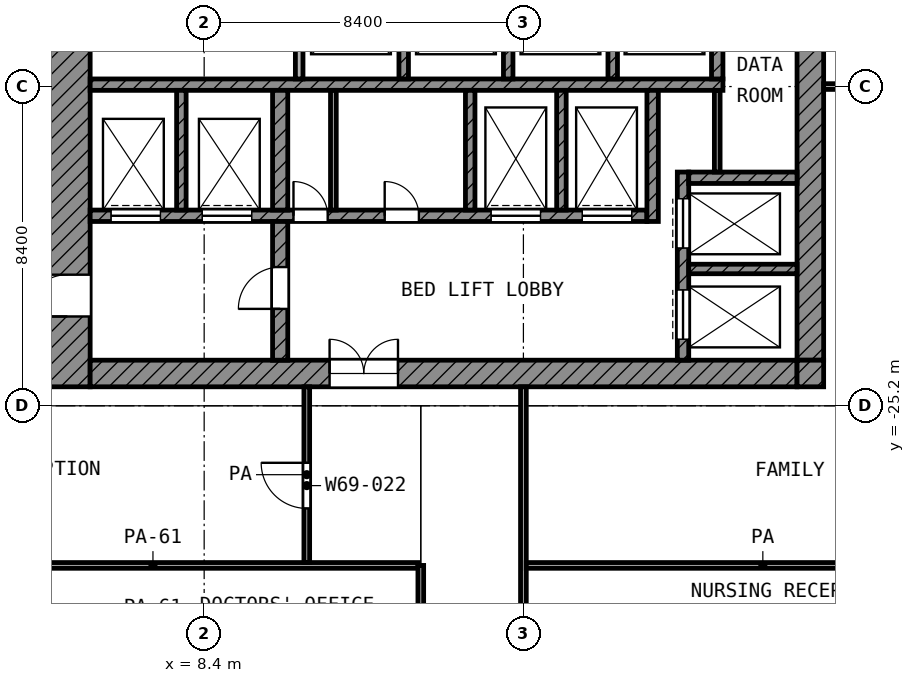
"""IFC4 building model, lengths in metres.
Left out: names, types, materials, properties, quantities, classifications, styles, units other than length and angle.
Written with IfcOpenShell. Run it as: python <this file> out.ifc"""

import sys

from ifc_helpers import new_model, si_unit, direction, frame, frame_2d, origin, place, context, subcontext, project, spatial, rectangle, extrude, element, fill, save


model = new_model("IFC4")
c1 = context("Model", 3, precision=1e-05, world=origin(), true_north=direction((0.0, 1.0)))
c2 = subcontext(c1, "Body", "Model", "MODEL_VIEW")
j1 = project(units=[si_unit("LENGTHUNIT", "METRE"), si_unit("PLANEANGLEUNIT", "RADIAN")], contexts=[c1])
p1 = place(None, origin())
s1 = spatial("IfcSite", under=j1, at=p1, CompositionType="ELEMENT")
p2 = place(p1, origin())
s2 = spatial("IfcBuilding", under=s1, at=p2, CompositionType="ELEMENT")
p3 = place(p2, frame((0.0, 0.0, 319.6)))
s3 = spatial("IfcBuildingStorey", under=s2, at=p3, CompositionType="ELEMENT", Elevation=319.6)
p4 = place(p3, frame((4.8, -24.7, 0.0), z_axis=(0.0, 0.0, 1.0), x_axis=(0.0, 1.0, 0.0)))
e1 = element("IfcWall", 1, at=p4, inside=s3, PredefinedType="SHEAR", context=c2, shape_type="SweptSolid", body=[
    extrude(rectangle(XDim=19.3, YDim=1.2, at=frame_2d((9.65, 0.0))), origin(), (0.0, 0.0, 1.0), 3.6),
])
p5 = place(p4, frame((11.15, 0.0, 0.0)))
e2 = element("IfcOpeningElement", 2, at=p5, cuts=e1, PredefinedType="OPENING", context=c2, shape_type="SweptSolid", body=[
    extrude(rectangle(XDim=1.1, YDim=2.1, at=frame_2d((0.55, 1.05))), frame((0.0, 0.61, 0.0), z_axis=(0.0, -1.0, 0.0), x_axis=(1.0, 0.0, 0.0)), (0.0, 0.0, 1.0), 1.22),
])
p6 = place(p4, frame((1.85, 0.0, 0.0)))
e3 = element("IfcOpeningElement", 3, at=p6, cuts=e1, PredefinedType="OPENING", context=c2, shape_type="SweptSolid", body=[
    extrude(rectangle(XDim=1.1, YDim=2.1, at=frame_2d((0.55, 1.05))), frame((0.0, 0.61, 0.0), z_axis=(0.0, -1.0, 0.0), x_axis=(1.0, 0.0, 0.0)), (0.0, 0.0, 1.0), 1.22),
])
p7 = place(p3, frame((24.35, -24.0, 0.0), z_axis=(0.0, 0.0, 1.0), x_axis=(0.0, 1.0, 0.0)))
e4 = element("IfcWall", 4, at=p7, inside=s3, PredefinedType="SHEAR", context=c2, shape_type="SweptSolid", body=[
    extrude(rectangle(XDim=18.6, YDim=0.7, at=frame_2d((9.3, 0.0))), origin(), (0.0, 0.0, 1.0), 3.6),
])
p8 = place(p7, frame((10.5, 0.0, 0.0)))
e5 = element("IfcOpeningElement", 5, at=p8, cuts=e4, PredefinedType="OPENING", context=c2, shape_type="SweptSolid", body=[
    extrude(rectangle(XDim=1.8, YDim=2.1, at=frame_2d((0.9, 1.05))), frame((0.0, 0.36, 0.0), z_axis=(0.0, -1.0, 0.0), x_axis=(1.0, 0.0, 0.0)), (0.0, 0.0, 1.0), 0.72),
])
p9 = place(p3, frame((5.4, -24.35, 0.0), z_axis=(0.0, 0.0, 1.0), x_axis=(1.0, 0.0, 0.0)))
e6 = element("IfcWall", 6, at=p9, inside=s3, PredefinedType="SHEAR", context=c2, shape_type="SweptSolid", body=[
    extrude(rectangle(XDim=18.6, YDim=0.7, at=frame_2d((9.3, 0.0))), origin(), (0.0, 0.0, 1.0), 3.6),
])
p10 = place(p9, frame((6.3, 0.0, 0.0)))
e7 = element("IfcOpeningElement", 7, at=p10, cuts=e6, PredefinedType="OPENING", context=c2, shape_type="SweptSolid", body=[
    extrude(rectangle(XDim=1.8, YDim=2.1, at=frame_2d((0.9, 1.05))), frame((0.0, 0.36, 0.0), z_axis=(0.0, -1.0, 0.0), x_axis=(1.0, 0.0, 0.0)), (0.0, 0.0, 1.0), 0.72),
])
p11 = place(p3, frame((24.35, -24.7, 0.0), z_axis=(0.0, 0.0, 1.0), x_axis=(0.0, 1.0, 0.0)))
e8 = element("IfcWall", 8, at=p11, inside=s3, PredefinedType="SHEAR", context=c2, shape_type="SweptSolid", body=[
    extrude(rectangle(XDim=0.7, YDim=0.7, at=frame_2d((0.35, 0.0))), origin(), (0.0, 0.0, 1.0), 3.6),
])
p12 = place(p3, frame((5.4, -16.75, 0.0), z_axis=(0.0, 0.0, 1.0), x_axis=(1.0, 0.0, 0.0)))
e9 = element("IfcWall", 9, at=p12, inside=s3, PredefinedType="SHEAR", context=c2, shape_type="SweptSolid", body=[
    extrude(rectangle(XDim=16.65, YDim=0.3, at=frame_2d((8.325, 0.0))), origin(), (0.0, 0.0, 1.0), 3.6),
])
p13 = place(p3, frame((5.4, -20.2, 0.0), z_axis=(0.0, 0.0, 1.0), x_axis=(1.0, 0.0, 0.0)))
e10 = element("IfcWall", 10, at=p13, inside=s3, PredefinedType="SHEAR", context=c2, shape_type="SweptSolid", body=[
    extrude(rectangle(XDim=14.65, YDim=0.3, at=frame_2d((7.325, 0.0))), origin(), (0.0, 0.0, 1.0), 3.6),
])
p14 = place(p13, frame((10.55, 0.0, 0.0)))
e11 = element("IfcOpeningElement", 11, at=p14, cuts=e10, PredefinedType="OPENING", context=c2, shape_type="SweptSolid", body=[
    extrude(rectangle(XDim=1.3, YDim=2.1, at=frame_2d((0.65, 1.05))), frame((0.0, 0.16, 0.0), z_axis=(0.0, -1.0, 0.0), x_axis=(1.0, 0.0, 0.0)), (0.0, 0.0, 1.0), 0.32),
])
p15 = place(p13, frame((12.95, 0.0, 0.0)))
e12 = element("IfcOpeningElement", 12, at=p15, cuts=e10, PredefinedType="OPENING", context=c2, shape_type="SweptSolid", body=[
    extrude(rectangle(XDim=1.3, YDim=2.1, at=frame_2d((0.65, 1.05))), frame((0.0, 0.16, 0.0), z_axis=(0.0, -1.0, 0.0), x_axis=(1.0, 0.0, 0.0)), (0.0, 0.0, 1.0), 0.32),
])
p16 = place(p13, frame((0.55, 0.0, 0.0)))
e13 = element("IfcOpeningElement", 13, at=p16, cuts=e10, PredefinedType="OPENING", context=c2, shape_type="SweptSolid", body=[
    extrude(rectangle(XDim=1.3, YDim=2.1, at=frame_2d((0.65, 1.05))), frame((0.0, 0.16, 0.0), z_axis=(0.0, -1.0, 0.0), x_axis=(1.0, 0.0, 0.0)), (0.0, 0.0, 1.0), 0.32),
])
p17 = place(p13, frame((2.95, 0.0, 0.0)))
e14 = element("IfcOpeningElement", 14, at=p17, cuts=e10, PredefinedType="OPENING", context=c2, shape_type="SweptSolid", body=[
    extrude(rectangle(XDim=1.3, YDim=2.1, at=frame_2d((0.65, 1.05))), frame((0.0, 0.16, 0.0), z_axis=(0.0, -1.0, 0.0), x_axis=(1.0, 0.0, 0.0)), (0.0, 0.0, 1.0), 0.32),
])
p18 = place(p13, frame((5.35, 0.0, 0.0)))
e15 = element("IfcOpeningElement", 15, at=p18, cuts=e10, PredefinedType="OPENING", context=c2, shape_type="SweptSolid", body=[
    extrude(rectangle(XDim=0.9, YDim=2.1, at=frame_2d((0.45, 1.05))), frame((0.0, 0.16, 0.0), z_axis=(0.0, -1.0, 0.0), x_axis=(1.0, 0.0, 0.0)), (0.0, 0.0, 1.0), 0.32),
])
p19 = place(p13, frame((7.75, 0.0, 0.0)))
e16 = element("IfcOpeningElement", 16, at=p19, cuts=e10, PredefinedType="OPENING", context=c2, shape_type="SweptSolid", body=[
    extrude(rectangle(XDim=0.9, YDim=2.1, at=frame_2d((0.45, 1.05))), frame((0.0, 0.16, 0.0), z_axis=(0.0, -1.0, 0.0), x_axis=(1.0, 0.0, 0.0)), (0.0, 0.0, 1.0), 0.32),
])
p20 = place(p3, frame((10.4, -24.0, 0.0), z_axis=(0.0, 0.0, 1.0), x_axis=(0.0, 1.0, 0.0)))
e17 = element("IfcWall", 17, at=p20, inside=s3, PredefinedType="SHEAR", context=c2, shape_type="SweptSolid", body=[
    extrude(rectangle(XDim=3.65, YDim=0.4, at=frame_2d((1.825, 0.0))), origin(), (0.0, 0.0, 1.0), 3.6),
])
p21 = place(p20, frame((1.35, 0.0, 0.0)))
e18 = element("IfcOpeningElement", 18, at=p21, cuts=e17, PredefinedType="OPENING", context=c2, shape_type="SweptSolid", body=[
    extrude(rectangle(XDim=1.1, YDim=2.1, at=frame_2d((0.55, 1.05))), frame((0.0, 0.21, 0.0), z_axis=(0.0, -1.0, 0.0), x_axis=(1.0, 0.0, 0.0)), (0.0, 0.0, 1.0), 0.42),
])
p22 = place(p3, frame((10.4, -20.05, 0.0), z_axis=(0.0, 0.0, 1.0), x_axis=(0.0, 1.0, 0.0)))
e19 = element("IfcWall", 19, at=p22, inside=s3, PredefinedType="SHEAR", context=c2, shape_type="SweptSolid", body=[
    extrude(rectangle(XDim=3.15, YDim=0.4, at=frame_2d((1.575, 0.0))), origin(), (0.0, 0.0, 1.0), 3.6),
])
p23 = place(p3, frame((20.2, -20.35, 0.0), z_axis=(0.0, 0.0, 1.0), x_axis=(0.0, 1.0, 0.0)))
e20 = element("IfcWall", 20, at=p23, inside=s3, PredefinedType="SHEAR", context=c2, shape_type="SweptSolid", body=[
    extrude(rectangle(XDim=3.45, YDim=0.3, at=frame_2d((1.725, 0.0))), origin(), (0.0, 0.0, 1.0), 3.6),
])
p24 = place(p3, frame((21.9, -16.6, 0.0), z_axis=(0.0, 0.0, 1.0), x_axis=(0.0, 1.0, 0.0)))
e21 = element("IfcWall", 21, at=p24, inside=s3, PredefinedType="SHEAR", context=c2, shape_type="SweptSolid", body=[
    extrude(rectangle(XDim=2.35, YDim=0.3, at=frame_2d((1.175, 0.0))), origin(), (0.0, 0.0, 1.0), 3.6),
])
p25 = place(p3, frame((21.15, -19.2, 0.0), z_axis=(0.0, 0.0, 1.0), x_axis=(1.0, 0.0, 0.0)))
e22 = element("IfcWall", 22, at=p25, inside=s3, PredefinedType="SHEAR", context=c2, shape_type="SweptSolid", body=[
    extrude(rectangle(XDim=2.85, YDim=0.3, at=frame_2d((1.425, 0.0))), origin(), (0.0, 0.0, 1.0), 3.6),
])
p26 = place(p3, frame((21.0, -24.0, 0.0), z_axis=(0.0, 0.0, 1.0), x_axis=(0.0, 1.0, 0.0)))
e23 = element("IfcWall", 23, at=p26, inside=s3, PredefinedType="SHEAR", context=c2, shape_type="SweptSolid", body=[
    extrude(rectangle(XDim=4.95, YDim=0.3, at=frame_2d((2.475, 0.0))), origin(), (0.0, 0.0, 1.0), 3.6),
])
p27 = place(p26, frame((2.95, 0.0, 0.0)))
e24 = element("IfcOpeningElement", 24, at=p27, cuts=e23, PredefinedType="OPENING", context=c2, shape_type="SweptSolid", body=[
    extrude(rectangle(XDim=1.3, YDim=2.1, at=frame_2d((0.65, 1.05))), frame((0.0, 0.16, 0.0), z_axis=(0.0, -1.0, 0.0), x_axis=(1.0, 0.0, 0.0)), (0.0, 0.0, 1.0), 0.32),
])
p28 = place(p26, frame((0.55, 0.0, 0.0)))
e25 = element("IfcOpeningElement", 25, at=p28, cuts=e23, PredefinedType="OPENING", context=c2, shape_type="SweptSolid", body=[
    extrude(rectangle(XDim=1.3, YDim=2.1, at=frame_2d((0.65, 1.05))), frame((0.0, 0.16, 0.0), z_axis=(0.0, -1.0, 0.0), x_axis=(1.0, 0.0, 0.0)), (0.0, 0.0, 1.0), 0.32),
])
p29 = place(p3, frame((21.15, -21.6, 0.0), z_axis=(0.0, 0.0, 1.0), x_axis=(1.0, 0.0, 0.0)))
e26 = element("IfcWall", 26, at=p29, inside=s3, PredefinedType="SHEAR", context=c2, shape_type="SweptSolid", body=[
    extrude(rectangle(XDim=2.85, YDim=0.25, at=frame_2d((1.425, 0.0))), origin(), (0.0, 0.0, 1.0), 3.6),
])
for number, where, z_axis, x_axis in (
    (27, (7.8, -20.05, 0.0), (0.0, 0.0, 1.0), (0.0, 1.0, 0.0)),
    (28, (15.4, -20.05, 0.0), (0.0, 0.0, 1.0), (0.0, 1.0, 0.0)),
    (29, (17.8, -20.05, 0.0), (0.0, 0.0, 1.0), (0.0, 1.0, 0.0)),
):
    element("IfcWall", number, at=place(p3, frame(where, z_axis=z_axis, x_axis=x_axis)), inside=s3, PredefinedType="SHEAR", context=c2, shape_type="SweptSolid", body=[
        extrude(rectangle(XDim=3.15, YDim=0.25, at=frame_2d((1.575, 0.0))), origin(), (0.0, 0.0, 1.0), 3.6),
    ])
p30 = place(p3, frame((10.9, -16.6, 0.0), z_axis=(0.0, 0.0, 1.0), x_axis=(0.0, 1.0, 0.0)))
e30 = element("IfcWall", 30, at=p30, inside=s3, PredefinedType="PARTITIONING", context=c2, shape_type="SweptSolid", body=[
    extrude(rectangle(XDim=2.35, YDim=0.2, at=frame_2d((1.175, 0.0))), origin(), (0.0, 0.0, 1.0), 3.6),
])
for number, where, z_axis, x_axis in (
    (31, (13.65, -16.6, 0.0), (0.0, 0.0, 1.0), (0.0, 1.0, 0.0)),
    (32, (16.4, -16.6, 0.0), (0.0, 0.0, 1.0), (0.0, 1.0, 0.0)),
    (33, (19.15, -16.6, 0.0), (0.0, 0.0, 1.0), (0.0, 1.0, 0.0)),
):
    element("IfcWall", number, at=place(p3, frame(where, z_axis=z_axis, x_axis=x_axis)), inside=s3, PredefinedType="SHEAR", context=c2, shape_type="SweptSolid", body=[
        extrude(rectangle(XDim=2.35, YDim=0.25, at=frame_2d((1.175, 0.0))), origin(), (0.0, 0.0, 1.0), 3.6),
    ])
p31 = place(p3, frame((21.9, -19.05, 0.0), z_axis=(0.0, 0.0, 1.0), x_axis=(0.0, 1.0, 0.0)))
e34 = element("IfcWall", 34, at=p31, inside=s3, PredefinedType="PARTITIONING", context=c2, shape_type="SweptSolid", body=[
    extrude(rectangle(XDim=2.15, YDim=0.15, at=frame_2d((1.075, 0.0))), origin(), (0.0, 0.0, 1.0), 3.6),
])
p32 = place(p3, frame((11.8, -20.05, 0.0), z_axis=(0.0, 0.0, 1.0), x_axis=(0.0, 1.0, 0.0)))
e35 = element("IfcWall", 35, at=p32, inside=s3, PredefinedType="PARTITIONING", context=c2, shape_type="SweptSolid", body=[
    extrude(rectangle(XDim=3.15, YDim=0.15, at=frame_2d((1.575, 0.0))), origin(), (0.0, 0.0, 1.0), 3.6),
])
p33 = place(p3, frame((0.08, -29.4, 0.0), z_axis=(0.0, 0.0, 1.0), x_axis=(1.0, 0.0, 0.0)))
e36 = element("IfcWall", 36, at=p33, inside=s3, PredefinedType="PARTITIONING", context=c2, shape_type="SweptSolid", body=[
    extrude(rectangle(XDim=13.945, YDim=0.15, at=frame_2d((6.972, 0.0))), origin(), (0.0, 0.0, 1.0), 2.7),
])
p34 = place(p3, frame((16.875, -29.4, 0.0), z_axis=(0.0, 0.0, 1.0), x_axis=(1.0, 0.0, 0.0)))
e37 = element("IfcWall", 37, at=p34, inside=s3, PredefinedType="PARTITIONING", context=c2, shape_type="SweptSolid", body=[
    extrude(rectangle(XDim=12.45, YDim=0.15, at=frame_2d((6.225, 0.0))), origin(), (0.0, 0.0, 1.0), 3.6),
])
p35 = place(p3, frame((24.7, -16.8, 0.0), z_axis=(0.0, 0.0, 1.0), x_axis=(1.0, 0.0, 0.0)))
e38 = element("IfcWall", 38, at=p35, inside=s3, PredefinedType="PARTITIONING", context=c2, shape_type="SweptSolid", body=[
    extrude(rectangle(XDim=34.02, YDim=0.15, at=frame_2d((17.01, 0.0))), origin(), (0.0, 0.0, 1.0), 3.6),
])
p36 = place(p35, frame((1.85, 0.0, 0.0)))
e39 = element("IfcOpeningElement", 39, at=p36, cuts=e38, PredefinedType="OPENING", context=c2, shape_type="SweptSolid", body=[
    extrude(rectangle(XDim=1.5, YDim=2.1, at=frame_2d((0.75, 1.05))), frame((0.0, 0.085, 0.0), z_axis=(0.0, -1.0, 0.0), x_axis=(1.0, 0.0, 0.0)), (0.0, 0.0, 1.0), 0.17),
])
p37 = place(p35, frame((6.2, 0.0, 0.0)))
e40 = element("IfcOpeningElement", 40, at=p37, cuts=e38, PredefinedType="OPENING", context=c2, shape_type="SweptSolid", body=[
    extrude(rectangle(XDim=1.2, YDim=2.1, at=frame_2d((0.6, 1.05))), frame((0.0, 0.085, 0.0), z_axis=(0.0, -1.0, 0.0), x_axis=(1.0, 0.0, 0.0)), (0.0, 0.0, 1.0), 0.17),
])
p38 = place(p35, frame((10.35, 0.0, 0.0)))
e41 = element("IfcOpeningElement", 41, at=p38, cuts=e38, PredefinedType="OPENING", context=c2, shape_type="SweptSolid", body=[
    extrude(rectangle(XDim=1.0, YDim=2.1, at=frame_2d((0.5, 1.05))), frame((0.0, 0.085, 0.0), z_axis=(0.0, -1.0, 0.0), x_axis=(1.0, 0.0, 0.0)), (0.0, 0.0, 1.0), 0.17),
])
p39 = place(p35, frame((20.0, 0.0, 0.0)))
e42 = element("IfcOpeningElement", 42, at=p39, cuts=e38, PredefinedType="OPENING", context=c2, shape_type="SweptSolid", body=[
    extrude(rectangle(XDim=1.2, YDim=2.1, at=frame_2d((0.6, 1.05))), frame((0.0, 0.085, 0.0), z_axis=(0.0, -1.0, 0.0), x_axis=(1.0, 0.0, 0.0)), (0.0, 0.0, 1.0), 0.17),
])
p40 = place(p35, frame((18.4, 0.0, 0.0)))
e43 = element("IfcOpeningElement", 43, at=p40, cuts=e38, PredefinedType="OPENING", context=c2, shape_type="SweptSolid", body=[
    extrude(rectangle(XDim=1.2, YDim=2.1, at=frame_2d((0.6, 1.05))), frame((0.0, 0.085, 0.0), z_axis=(0.0, -1.0, 0.0), x_axis=(1.0, 0.0, 0.0)), (0.0, 0.0, 1.0), 0.17),
])
p41 = place(p35, frame((23.1, 0.0, 0.0)))
e44 = element("IfcOpeningElement", 44, at=p41, cuts=e38, PredefinedType="OPENING", context=c2, shape_type="SweptSolid", body=[
    extrude(rectangle(XDim=1.0, YDim=2.1, at=frame_2d((0.5, 1.05))), frame((0.0, 0.085, 0.0), z_axis=(0.0, -1.0, 0.0), x_axis=(1.0, 0.0, 0.0)), (0.0, 0.0, 1.0), 0.17),
])
p42 = place(p35, frame((29.15, 0.0, 0.0)))
e45 = element("IfcOpeningElement", 45, at=p42, cuts=e38, PredefinedType="OPENING", context=c2, shape_type="SweptSolid", body=[
    extrude(rectangle(XDim=1.5, YDim=2.1, at=frame_2d((0.75, 1.05))), frame((0.0, 0.085, 0.0), z_axis=(0.0, -1.0, 0.0), x_axis=(1.0, 0.0, 0.0)), (0.0, 0.0, 1.0), 0.17),
])
p43 = place(p3, frame((11.1, -29.325, 0.0), z_axis=(0.0, 0.0, 1.0), x_axis=(0.0, 1.0, 0.0)))
e46 = element("IfcWall", 46, at=p43, inside=s3, PredefinedType="PARTITIONING", context=c2, shape_type="SweptSolid", body=[
    extrude(rectangle(XDim=4.625, YDim=0.15, at=frame_2d((2.312, 0.0))), origin(), (0.0, 0.0, 1.0), 3.6),
])
p44 = place(p43, frame((1.425, 0.0, 0.0)))
e47 = element("IfcOpeningElement", 47, at=p44, cuts=e46, PredefinedType="OPENING", context=c2, shape_type="SweptSolid", body=[
    extrude(rectangle(XDim=1.2, YDim=2.1, at=frame_2d((0.6, 1.05))), frame((0.0, 0.085, 0.0), z_axis=(0.0, -1.0, 0.0), x_axis=(1.0, 0.0, 0.0)), (0.0, 0.0, 1.0), 0.17),
])
p45 = place(p3, frame((14.1, -31.957, 0.0), z_axis=(0.0, 0.0, 1.0), x_axis=(0.0, 1.0, 0.0)))
e48 = element("IfcWall", 48, at=p45, inside=s3, PredefinedType="PARTITIONING", context=c2, shape_type="SweptSolid", body=[
    extrude(rectangle(XDim=2.557, YDim=0.15, at=frame_2d((1.279, 0.0))), origin(), (0.0, 0.0, 1.0), 3.6),
])
p46 = place(p3, frame((16.8, -41.92, 0.0), z_axis=(0.0, 0.0, 1.0), x_axis=(0.0, 1.0, 0.0)))
e49 = element("IfcWall", 49, at=p46, inside=s3, PredefinedType="PARTITIONING", context=c2, shape_type="SweptSolid", body=[
    extrude(rectangle(XDim=17.22, YDim=0.15, at=frame_2d((8.61, 0.0))), origin(), (0.0, 0.0, 1.0), 3.6),
])
p47 = place(p46, frame((9.82, 0.0, 0.0)))
e50 = element("IfcOpeningElement", 50, at=p47, cuts=e49, PredefinedType="OPENING", context=c2, shape_type="SweptSolid", body=[
    extrude(rectangle(XDim=1.2, YDim=2.1, at=frame_2d((0.6, 1.05))), frame((0.0, 0.085, 0.0), z_axis=(0.0, -1.0, 0.0), x_axis=(1.0, 0.0, 0.0)), (0.0, 0.0, 1.0), 0.17),
])
p48 = place(p46, frame((5.87, 0.0, 0.0)))
e51 = element("IfcOpeningElement", 51, at=p48, cuts=e49, PredefinedType="OPENING", context=c2, shape_type="SweptSolid", body=[
    extrude(rectangle(XDim=1.0, YDim=2.1, at=frame_2d((0.5, 1.05))), frame((0.0, 0.085, 0.0), z_axis=(0.0, -1.0, 0.0), x_axis=(1.0, 0.0, 0.0)), (0.0, 0.0, 1.0), 0.17),
])
p49 = place(p46, frame((1.67, 0.0, 0.0)))
e52 = element("IfcOpeningElement", 52, at=p49, cuts=e49, PredefinedType="OPENING", context=c2, shape_type="SweptSolid", body=[
    extrude(rectangle(XDim=1.0, YDim=2.1, at=frame_2d((0.5, 1.05))), frame((0.0, 0.085, 0.0), z_axis=(0.0, -1.0, 0.0), x_axis=(1.0, 0.0, 0.0)), (0.0, 0.0, 1.0), 0.17),
])
p50 = place(p27, origin())
e53 = element("IfcDoor", 53, at=p50, inside=s3, OperationType="DOUBLE_DOOR_SLIDING", PredefinedType="DOOR", context=c2, shape_type="SweptSolid", body=[
    extrude(rectangle(XDim=1.3, YDim=2.1, at=frame_2d((0.65, 1.05))), frame((0.0, 0.025, 0.0), z_axis=(0.0, -1.0, 0.0), x_axis=(1.0, 0.0, 0.0)), (0.0, 0.0, 1.0), 0.05),
])
fill(e24, e53)
p51 = place(p28, origin())
e54 = element("IfcDoor", 54, at=p51, inside=s3, OperationType="DOUBLE_DOOR_SLIDING", PredefinedType="DOOR", context=c2, shape_type="SweptSolid", body=[
    extrude(rectangle(XDim=1.3, YDim=2.1, at=frame_2d((0.65, 1.05))), frame((0.0, 0.025, 0.0), z_axis=(0.0, -1.0, 0.0), x_axis=(1.0, 0.0, 0.0)), (0.0, 0.0, 1.0), 0.05),
])
fill(e25, e54)
p52 = place(p14, origin())
e55 = element("IfcDoor", 55, at=p52, inside=s3, OperationType="DOUBLE_DOOR_SLIDING", PredefinedType="DOOR", context=c2, shape_type="SweptSolid", body=[
    extrude(rectangle(XDim=1.3, YDim=2.1, at=frame_2d((0.65, 1.05))), frame((0.0, 0.025, 0.0), z_axis=(0.0, -1.0, 0.0), x_axis=(1.0, 0.0, 0.0)), (0.0, 0.0, 1.0), 0.05),
])
fill(e11, e55)
p53 = place(p15, origin())
e56 = element("IfcDoor", 56, at=p53, inside=s3, OperationType="DOUBLE_DOOR_SLIDING", PredefinedType="DOOR", context=c2, shape_type="SweptSolid", body=[
    extrude(rectangle(XDim=1.3, YDim=2.1, at=frame_2d((0.65, 1.05))), frame((0.0, 0.025, 0.0), z_axis=(0.0, -1.0, 0.0), x_axis=(1.0, 0.0, 0.0)), (0.0, 0.0, 1.0), 0.05),
])
fill(e12, e56)
p54 = place(p16, origin())
e57 = element("IfcDoor", 57, at=p54, inside=s3, OperationType="DOUBLE_DOOR_SLIDING", PredefinedType="DOOR", context=c2, shape_type="SweptSolid", body=[
    extrude(rectangle(XDim=1.3, YDim=2.1, at=frame_2d((0.65, 1.05))), frame((0.0, 0.025, 0.0), z_axis=(0.0, -1.0, 0.0), x_axis=(1.0, 0.0, 0.0)), (0.0, 0.0, 1.0), 0.05),
])
fill(e13, e57)
p55 = place(p17, origin())
e58 = element("IfcDoor", 58, at=p55, inside=s3, OperationType="DOUBLE_DOOR_SLIDING", PredefinedType="DOOR", context=c2, shape_type="SweptSolid", body=[
    extrude(rectangle(XDim=1.3, YDim=2.1, at=frame_2d((0.65, 1.05))), frame((0.0, 0.025, 0.0), z_axis=(0.0, -1.0, 0.0), x_axis=(1.0, 0.0, 0.0)), (0.0, 0.0, 1.0), 0.05),
])
fill(e14, e58)
p56 = place(p6, origin())
e59 = element("IfcDoor", 59, at=p56, inside=s3, OperationType="SINGLE_SWING_LEFT", PredefinedType="DOOR", context=c2, shape_type="SweptSolid", body=[
    extrude(rectangle(XDim=1.1, YDim=2.1, at=frame_2d((0.55, 1.05))), frame((0.0, 0.025, 0.0), z_axis=(0.0, -1.0, 0.0), x_axis=(1.0, 0.0, 0.0)), (0.0, 0.0, 1.0), 0.05),
])
fill(e3, e59)
p57 = place(p21, origin())
e60 = element("IfcDoor", 60, at=p57, inside=s3, OperationType="SINGLE_SWING_LEFT", PredefinedType="DOOR", context=c2, shape_type="SweptSolid", body=[
    extrude(rectangle(XDim=1.1, YDim=2.1, at=frame_2d((0.55, 1.05))), frame((0.0, 0.025, 0.0), z_axis=(0.0, -1.0, 0.0), x_axis=(1.0, 0.0, 0.0)), (0.0, 0.0, 1.0), 0.05),
])
fill(e18, e60)
p58 = place(p10, origin())
e61 = element("IfcDoor", 61, at=p58, inside=s3, OperationType="DOUBLE_DOOR_SINGLE_SWING", PredefinedType="DOOR", context=c2, shape_type="SweptSolid", body=[
    extrude(rectangle(XDim=1.8, YDim=2.1, at=frame_2d((0.9, 1.05))), frame((0.0, 0.025, 0.0), z_axis=(0.0, -1.0, 0.0), x_axis=(1.0, 0.0, 0.0)), (0.0, 0.0, 1.0), 0.05),
])
fill(e7, e61)
p59 = place(p18, origin())
e62 = element("IfcDoor", 62, at=p59, inside=s3, OperationType="SINGLE_SWING_LEFT", PredefinedType="DOOR", context=c2, shape_type="SweptSolid", body=[
    extrude(rectangle(XDim=0.9, YDim=2.1, at=frame_2d((0.45, 1.05))), frame((0.0, 0.025, 0.0), z_axis=(0.0, -1.0, 0.0), x_axis=(1.0, 0.0, 0.0)), (0.0, 0.0, 1.0), 0.05),
])
fill(e15, e62)
p60 = place(p19, origin())
e63 = element("IfcDoor", 63, at=p60, inside=s3, OperationType="SINGLE_SWING_LEFT", PredefinedType="DOOR", context=c2, shape_type="SweptSolid", body=[
    extrude(rectangle(XDim=0.9, YDim=2.1, at=frame_2d((0.45, 1.05))), frame((0.0, 0.025, 0.0), z_axis=(0.0, -1.0, 0.0), x_axis=(1.0, 0.0, 0.0)), (0.0, 0.0, 1.0), 0.05),
])
fill(e16, e63)
p61 = place(p44, origin())
e64 = element("IfcDoor", 64, at=p61, inside=s3, OperationType="SINGLE_SWING_RIGHT", PredefinedType="DOOR", context=c2, shape_type="SweptSolid", body=[
    extrude(rectangle(XDim=1.2, YDim=2.1, at=frame_2d((0.6, 1.05))), frame((0.0, 0.025, 0.0), z_axis=(0.0, -1.0, 0.0), x_axis=(1.0, 0.0, 0.0)), (0.0, 0.0, 1.0), 0.05),
])
fill(e47, e64)
save(model, sys.argv[1])
